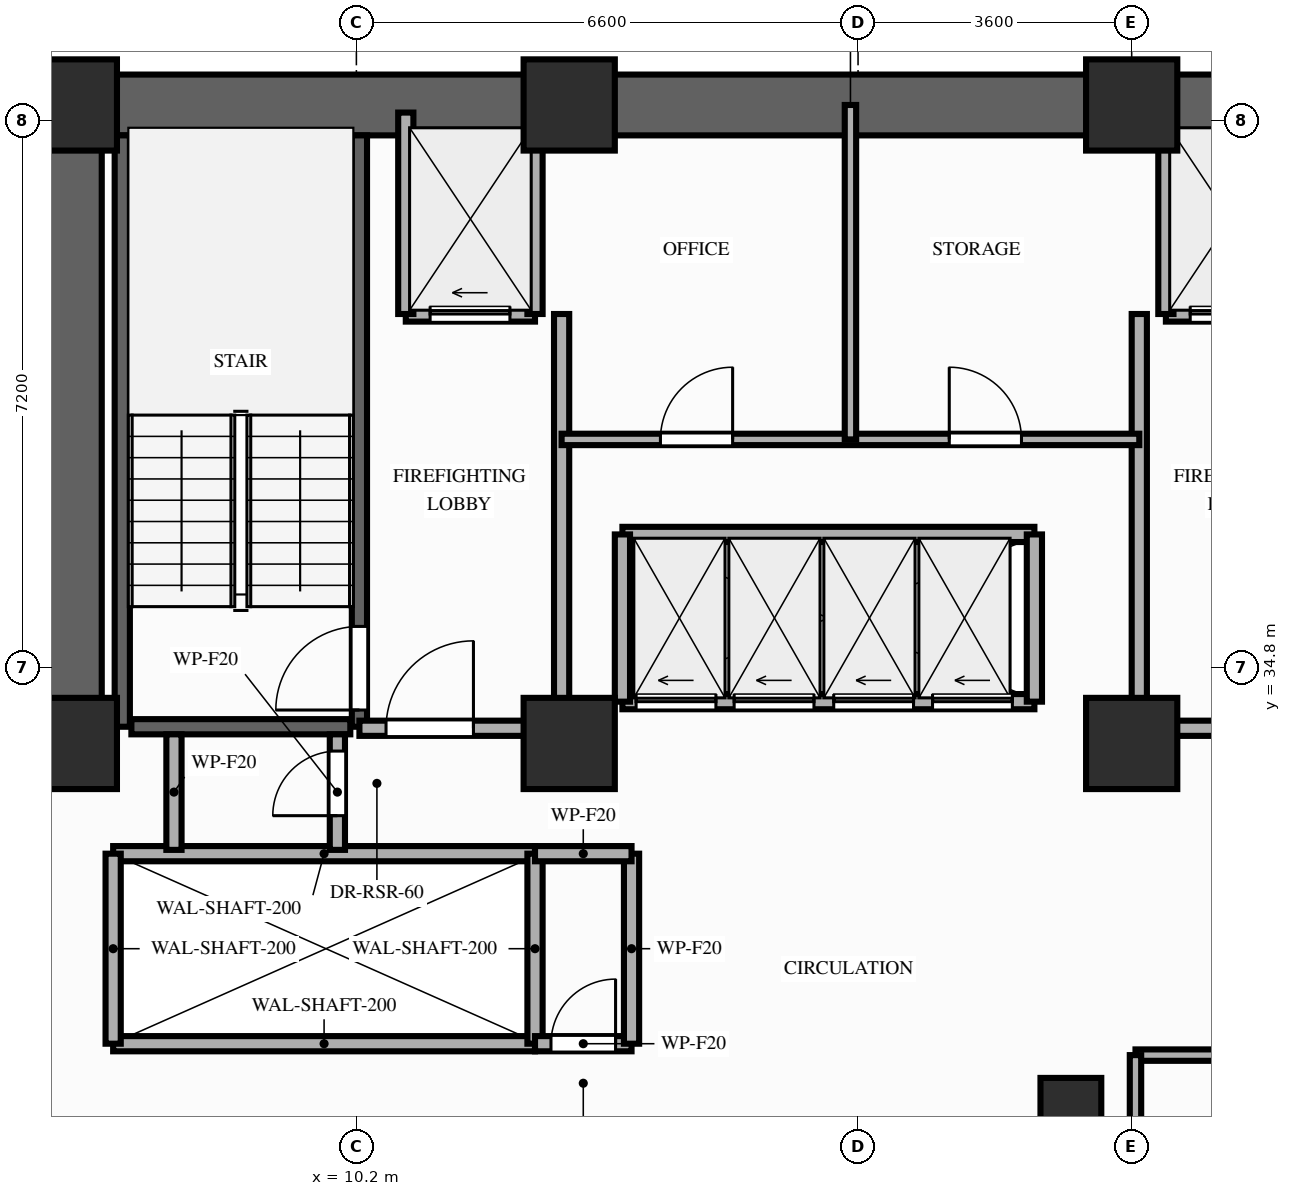
"""IFC4 building model, lengths in metres.
Left out: names, types, materials, properties, quantities, classifications, styles, units other than length and angle.
Written with IfcOpenShell. Run it as: python <this file> out.ifc"""

import sys

from ifc_helpers import new_model, si_unit, direction, frame, frame_2d, origin, origin_2d, place, context, subcontext, project, spatial, rectangle, extrude, element, fill, save


model = new_model("IFC4")
c1 = context("Model", 3, precision=1e-05, world=origin(), true_north=direction((0.0, 1.0)))
c2 = subcontext(c1, "Body", "Model", "MODEL_VIEW")
j1 = project(units=[si_unit("LENGTHUNIT", "METRE"), si_unit("PLANEANGLEUNIT", "RADIAN")], contexts=[c1])
p1 = place(None, origin())
s1 = spatial("IfcSite", under=j1, at=p1, CompositionType="ELEMENT")
p2 = place(p1, origin())
s2 = spatial("IfcBuilding", under=s1, at=p2, CompositionType="ELEMENT")
p3 = place(p2, frame((0.0, 0.0, 89.8)))
s3 = spatial("IfcBuildingStorey", under=s2, at=p3, CompositionType="ELEMENT", Elevation=89.8)
for number, where, z_axis, x_axis in (
    (1, (6.45, 33.8, 0.0), (0.0, 0.0, 1.0), (1.0, 0.0, 0.0)),
    (2, (13.0, 33.8, 0.0), (0.0, 0.0, 1.0), (1.0, 0.0, 0.0)),
    (3, (20.4, 33.8, 0.0), (0.0, 0.0, 1.0), (1.0, 0.0, 0.0)),
    (4, (6.45, 42.2, 0.0), (0.0, 0.0, 1.0), (1.0, 0.0, 0.0)),
    (5, (13.0, 42.2, 0.0), (0.0, 0.0, 1.0), (1.0, 0.0, 0.0)),
    (6, (20.4, 42.2, 0.0), (0.0, 0.0, 1.0), (1.0, 0.0, 0.0)),
):
    element("IfcColumn", number, at=place(p3, frame(where, z_axis=z_axis, x_axis=x_axis)), inside=s3, PredefinedType="COLUMN", context=c2, shape_type="SweptSolid", body=[
        extrude(rectangle(XDim=1.2, YDim=1.2, at=origin_2d()), origin(), (0.0, 0.0, 1.0), 3.2),
    ])
p4 = place(p3, frame((19.6, 28.8, 0.0), z_axis=(0.0, 0.0, 1.0), x_axis=(1.0, 0.0, 0.0)))
e7 = element("IfcColumn", 7, at=p4, inside=s3, PredefinedType="COLUMN", context=c2, shape_type="SweptSolid", body=[
    extrude(rectangle(XDim=0.8, YDim=1.2, at=origin_2d()), origin(), (0.0, 0.0, 1.0), 3.2),
])
p5 = place(p3, frame((6.45, 42.2, 0.0), z_axis=(0.0, 0.0, 1.0), x_axis=(1.0, 0.0, 0.0)))
e8 = element("IfcWall", 8, at=p5, inside=s3, PredefinedType="SHEAR", context=c2, shape_type="SweptSolid", body=[
    extrude(rectangle(XDim=20.45, YDim=0.8, at=frame_2d((10.225, 0.0))), origin(), (0.0, 0.0, 1.0), 3.02),
])
p6 = place(p3, frame((6.45, 33.8, 0.0), z_axis=(0.0, 0.0, 1.0), x_axis=(0.0, 1.0, 0.0)))
e9 = element("IfcWall", 9, at=p6, inside=s3, PredefinedType="SHEAR", context=c2, shape_type="SweptSolid", body=[
    extrude(rectangle(XDim=7.95, YDim=0.8, at=frame_2d((3.975, 0.0))), origin(), (0.0, 0.0, 1.0), 3.02),
])
p7 = place(p3, frame((7.12, 34.02, 0.0), z_axis=(0.0, 0.0, 1.0), x_axis=(0.0, 1.0, 0.0)))
e10 = element("IfcWall", 10, at=p7, inside=s3, PredefinedType="SHEAR", context=c2, shape_type="SweptSolid", body=[
    extrude(rectangle(XDim=7.78, YDim=0.2, at=frame_2d((3.89, 0.0))), origin(), (0.0, 0.0, 1.0), 3.02),
])
p8 = place(p3, frame((10.24, 34.02, 0.0), z_axis=(0.0, 0.0, 1.0), x_axis=(0.0, 1.0, 0.0)))
e11 = element("IfcWall", 11, at=p8, inside=s3, PredefinedType="SHEAR", context=c2, shape_type="SweptSolid", body=[
    extrude(rectangle(XDim=7.78, YDim=0.2, at=frame_2d((3.89, 0.0))), origin(), (0.0, 0.0, 1.0), 3.02),
])
p9 = place(p8, frame((0.22, 0.0, 0.0)))
e12 = element("IfcOpeningElement", 12, at=p9, cuts=e11, PredefinedType="OPENING", context=c2, shape_type="SweptSolid", body=[
    extrude(rectangle(XDim=1.1, YDim=2.15, at=frame_2d((0.55, 1.075))), frame((0.0, 0.11, 0.0), z_axis=(0.0, -1.0, 0.0), x_axis=(1.0, 0.0, 0.0)), (0.0, 0.0, 1.0), 0.22),
])
p10 = place(p3, frame((7.24, 34.02, 0.0), z_axis=(0.0, 0.0, 1.0), x_axis=(1.0, 0.0, 0.0)))
e13 = element("IfcWall", 13, at=p10, inside=s3, PredefinedType="SHEAR", context=c2, shape_type="SweptSolid", body=[
    extrude(rectangle(XDim=2.88, YDim=0.2, at=frame_2d((1.44, 0.0))), origin(), (0.0, 0.0, 1.0), 3.02),
])
for number, where, z_axis, x_axis in (
    (14, (7.0, 29.85, 0.0), (0.0, 0.0, 1.0), (1.0, 0.0, 0.0)),
    (15, (7.0, 32.35, 0.0), (0.0, 0.0, 1.0), (1.0, 0.0, 0.0)),
):
    element("IfcWall", number, at=place(p3, frame(where, z_axis=z_axis, x_axis=x_axis)), inside=s3, PredefinedType="MOVABLE", context=c2, shape_type="SweptSolid", body=[
        extrude(rectangle(XDim=5.55, YDim=0.2, at=frame_2d((2.775, 0.0))), origin(), (0.0, 0.0, 1.0), 3.02),
    ])
for number, where, z_axis, x_axis in (
    (16, (7.0, 29.85, 0.0), (0.0, 0.0, 1.0), (0.0, 1.0, 0.0)),
    (17, (12.55, 29.85, 0.0), (0.0, 0.0, 1.0), (0.0, 1.0, 0.0)),
):
    element("IfcWall", number, at=place(p3, frame(where, z_axis=z_axis, x_axis=x_axis)), inside=s3, PredefinedType="MOVABLE", context=c2, shape_type="SweptSolid", body=[
        extrude(rectangle(XDim=2.5, YDim=0.2, at=frame_2d((1.25, 0.0))), origin(), (0.0, 0.0, 1.0), 3.02),
    ])
p11 = place(p3, frame((10.85, 39.45, 0.0), z_axis=(0.0, 0.0, 1.0), x_axis=(1.0, 0.0, 0.0)))
e18 = element("IfcWall", 18, at=p11, inside=s3, PredefinedType="MOVABLE", context=c2, shape_type="SweptSolid", body=[
    extrude(rectangle(XDim=1.7, YDim=0.2, at=frame_2d((0.85, 0.0))), origin(), (0.0, 0.0, 1.0), 3.02),
])
p12 = place(p11, frame((0.32, 0.0, 0.0)))
e19 = element("IfcOpeningElement", 19, at=p12, cuts=e18, PredefinedType="OPENING", context=c2, shape_type="SweptSolid", body=[
    extrude(rectangle(XDim=1.05, YDim=2.15, at=frame_2d((0.525, 1.075))), frame((0.0, 0.11, 0.0), z_axis=(0.0, -1.0, 0.0), x_axis=(1.0, 0.0, 0.0)), (0.0, 0.0, 1.0), 0.22),
])
p13 = place(p3, frame((20.85, 39.45, 0.0), z_axis=(0.0, 0.0, 1.0), x_axis=(1.0, 0.0, 0.0)))
e20 = element("IfcWall", 20, at=p13, inside=s3, PredefinedType="MOVABLE", context=c2, shape_type="SweptSolid", body=[
    extrude(rectangle(XDim=1.7, YDim=0.2, at=frame_2d((0.85, 0.0))), origin(), (0.0, 0.0, 1.0), 3.02),
])
p14 = place(p13, frame((0.32, 0.0, 0.0)))
e21 = element("IfcOpeningElement", 21, at=p14, cuts=e20, PredefinedType="OPENING", context=c2, shape_type="SweptSolid", body=[
    extrude(rectangle(XDim=1.05, YDim=2.15, at=frame_2d((0.525, 1.075))), frame((0.0, 0.11, 0.0), z_axis=(0.0, -1.0, 0.0), x_axis=(1.0, 0.0, 0.0)), (0.0, 0.0, 1.0), 0.22),
])
for number, where, z_axis, x_axis in (
    (22, (10.85, 39.45, 0.0), (0.0, 0.0, 1.0), (0.0, 1.0, 0.0)),
    (23, (12.55, 39.45, 0.0), (0.0, 0.0, 1.0), (0.0, 1.0, 0.0)),
):
    element("IfcWall", number, at=place(p3, frame(where, z_axis=z_axis, x_axis=x_axis)), inside=s3, PredefinedType="MOVABLE", context=c2, shape_type="SweptSolid", body=[
        extrude(rectangle(XDim=2.65, YDim=0.2, at=frame_2d((1.325, 0.0))), origin(), (0.0, 0.0, 1.0), 2.4),
    ])
p15 = place(p3, frame((12.9, 34.0, 0.0), z_axis=(0.0, 0.0, 1.0), x_axis=(0.0, 1.0, 0.0)))
e24 = element("IfcWall", 24, at=p15, inside=s3, PredefinedType="PARTITIONING", context=c2, shape_type="SweptSolid", body=[
    extrude(rectangle(XDim=5.45, YDim=0.2, at=frame_2d((2.725, 0.0))), origin(), (0.0, 0.0, 1.0), 2.4),
])
p16 = place(p3, frame((10.24, 34.0, 0.0), z_axis=(0.0, 0.0, 1.0), x_axis=(1.0, 0.0, 0.0)))
e25 = element("IfcWall", 25, at=p16, inside=s3, PredefinedType="PARTITIONING", context=c2, shape_type="SweptSolid", body=[
    extrude(rectangle(XDim=2.66, YDim=0.2, at=frame_2d((1.33, 0.0))), origin(), (0.0, 0.0, 1.0), 2.4),
])
p17 = place(p16, frame((0.35, 0.0, 0.0)))
e26 = element("IfcOpeningElement", 26, at=p17, cuts=e25, PredefinedType="OPENING", context=c2, shape_type="SweptSolid", body=[
    extrude(rectangle(XDim=1.15, YDim=2.15, at=frame_2d((0.575, 1.075))), frame((0.0, 0.11, 0.0), z_axis=(0.0, -1.0, 0.0), x_axis=(1.0, 0.0, 0.0)), (0.0, 0.0, 1.0), 0.22),
])
p18 = place(p3, frame((20.85, 39.45, 0.0), z_axis=(0.0, 0.0, 1.0), x_axis=(0.0, 1.0, 0.0)))
e27 = element("IfcWall", 27, at=p18, inside=s3, PredefinedType="MOVABLE", context=c2, shape_type="SweptSolid", body=[
    extrude(rectangle(XDim=2.65, YDim=0.2, at=frame_2d((1.325, 0.0))), origin(), (0.0, 0.0, 1.0), 2.4),
])
p19 = place(p3, frame((20.5, 34.0, 0.0), z_axis=(0.0, 0.0, 1.0), x_axis=(0.0, 1.0, 0.0)))
e28 = element("IfcWall", 28, at=p19, inside=s3, PredefinedType="PARTITIONING", context=c2, shape_type="SweptSolid", body=[
    extrude(rectangle(XDim=5.45, YDim=0.2, at=frame_2d((2.725, 0.0))), origin(), (0.0, 0.0, 1.0), 2.4),
])
p20 = place(p3, frame((20.5, 34.0, 0.0), z_axis=(0.0, 0.0, 1.0), x_axis=(1.0, 0.0, 0.0)))
e29 = element("IfcWall", 29, at=p20, inside=s3, PredefinedType="PARTITIONING", context=c2, shape_type="SweptSolid", body=[
    extrude(rectangle(XDim=2.6, YDim=0.2, at=frame_2d((1.3, 0.0))), origin(), (0.0, 0.0, 1.0), 2.4),
])
p21 = place(p20, frame((1.05, 0.0, 0.0)))
e30 = element("IfcOpeningElement", 30, at=p21, cuts=e29, PredefinedType="OPENING", context=c2, shape_type="SweptSolid", body=[
    extrude(rectangle(XDim=1.15, YDim=2.15, at=frame_2d((0.575, 1.075))), frame((0.0, 0.11, 0.0), z_axis=(0.0, -1.0, 0.0), x_axis=(1.0, 0.0, 0.0)), (0.0, 0.0, 1.0), 0.22),
])
p22 = place(p3, frame((12.55, 29.85, 0.0), z_axis=(0.0, 0.0, 1.0), x_axis=(1.0, 0.0, 0.0)))
e31 = element("IfcWall", 31, at=p22, inside=s3, PredefinedType="PARTITIONING", context=c2, shape_type="SweptSolid", body=[
    extrude(rectangle(XDim=1.27, YDim=0.2, at=frame_2d((0.635, 0.0))), origin(), (0.0, 0.0, 1.0), 3.02),
])
p23 = place(p22, frame((0.21, 0.0, 0.0)))
e32 = element("IfcOpeningElement", 32, at=p23, cuts=e31, PredefinedType="OPENING", context=c2, shape_type="SweptSolid", body=[
    extrude(rectangle(XDim=0.85, YDim=2.05, at=frame_2d((0.425, 1.025))), frame((0.0, 0.11, 0.0), z_axis=(0.0, -1.0, 0.0), x_axis=(1.0, 0.0, 0.0)), (0.0, 0.0, 1.0), 0.22),
])
p24 = place(p3, frame((13.82, 29.85, 0.0), z_axis=(0.0, 0.0, 1.0), x_axis=(0.0, 1.0, 0.0)))
e33 = element("IfcWall", 33, at=p24, inside=s3, PredefinedType="PARTITIONING", context=c2, shape_type="SweptSolid", body=[
    extrude(rectangle(XDim=2.5, YDim=0.2, at=frame_2d((1.25, 0.0))), origin(), (0.0, 0.0, 1.0), 3.02),
])
p25 = place(p3, frame((12.55, 32.35, 0.0), z_axis=(0.0, 0.0, 1.0), x_axis=(1.0, 0.0, 0.0)))
e34 = element("IfcWall", 34, at=p25, inside=s3, PredefinedType="PARTITIONING", context=c2, shape_type="SweptSolid", body=[
    extrude(rectangle(XDim=1.27, YDim=0.2, at=frame_2d((0.635, 0.0))), origin(), (0.0, 0.0, 1.0), 3.02),
])
p26 = place(p3, frame((7.8, 32.4, 0.0), z_axis=(0.0, 0.0, 1.0), x_axis=(0.0, 1.0, 0.0)))
e35 = element("IfcWall", 35, at=p26, inside=s3, PredefinedType="PARTITIONING", context=c2, shape_type="SweptSolid", body=[
    extrude(rectangle(XDim=1.52, YDim=0.2, at=frame_2d((0.76, 0.0))), origin(), (0.0, 0.0, 1.0), 2.4),
])
p27 = place(p3, frame((9.95, 32.4, 0.0), z_axis=(0.0, 0.0, 1.0), x_axis=(0.0, 1.0, 0.0)))
e36 = element("IfcWall", 36, at=p27, inside=s3, PredefinedType="PARTITIONING", context=c2, shape_type="SweptSolid", body=[
    extrude(rectangle(XDim=1.52, YDim=0.2, at=frame_2d((0.76, 0.0))), origin(), (0.0, 0.0, 1.0), 2.4),
])
p28 = place(p27, frame((0.45, 0.0, 0.0)))
e37 = element("IfcOpeningElement", 37, at=p28, cuts=e36, PredefinedType="OPENING", context=c2, shape_type="SweptSolid", body=[
    extrude(rectangle(XDim=0.85, YDim=2.05, at=frame_2d((0.425, 1.025))), frame((0.0, 0.11, 0.0), z_axis=(0.0, -1.0, 0.0), x_axis=(1.0, 0.0, 0.0)), (0.0, 0.0, 1.0), 0.22),
])
p29 = place(p3, frame((12.9, 37.8, 0.0), z_axis=(0.0, 0.0, 1.0), x_axis=(1.0, 0.0, 0.0)))
e38 = element("IfcWall", 38, at=p29, inside=s3, PredefinedType="PARTITIONING", context=c2, shape_type="SweptSolid", body=[
    extrude(rectangle(XDim=7.6, YDim=0.15, at=frame_2d((3.8, 0.0))), origin(), (0.0, 0.0, 1.0), 3.02),
])
p30 = place(p29, frame((1.3, 0.0, 0.0)))
e39 = element("IfcOpeningElement", 39, at=p30, cuts=e38, PredefinedType="OPENING", context=c2, shape_type="SweptSolid", body=[
    extrude(rectangle(XDim=0.95, YDim=2.15, at=frame_2d((0.475, 1.075))), frame((0.0, 0.085, 0.0), z_axis=(0.0, -1.0, 0.0), x_axis=(1.0, 0.0, 0.0)), (0.0, 0.0, 1.0), 0.17),
])
p31 = place(p29, frame((5.1, 0.0, 0.0)))
e40 = element("IfcOpeningElement", 40, at=p31, cuts=e38, PredefinedType="OPENING", context=c2, shape_type="SweptSolid", body=[
    extrude(rectangle(XDim=0.95, YDim=2.15, at=frame_2d((0.475, 1.075))), frame((0.0, 0.085, 0.0), z_axis=(0.0, -1.0, 0.0), x_axis=(1.0, 0.0, 0.0)), (0.0, 0.0, 1.0), 0.17),
])
p32 = place(p3, frame((16.7, 37.8, 0.0), z_axis=(0.0, 0.0, 1.0), x_axis=(0.0, 1.0, 0.0)))
e41 = element("IfcWall", 41, at=p32, inside=s3, PredefinedType="PARTITIONING", context=c2, shape_type="SweptSolid", body=[
    extrude(rectangle(XDim=4.4, YDim=0.15, at=frame_2d((2.2, 0.0))), origin(), (0.0, 0.0, 1.0), 2.4),
])
p33 = place(p3, frame((13.7, 34.35, 0.0), z_axis=(0.0, 0.0, 1.0), x_axis=(1.0, 0.0, 0.0)))
e42 = element("IfcWall", 42, at=p33, inside=s3, PredefinedType="MOVABLE", context=c2, shape_type="SweptSolid", body=[
    extrude(rectangle(XDim=5.42, YDim=0.2, at=frame_2d((2.71, 0.0))), origin(), (0.0, 0.0, 1.0), 3.02),
])
p34 = place(p33, frame((0.18, 0.0, 0.0)))
e43 = element("IfcOpeningElement", 43, at=p34, cuts=e42, PredefinedType="OPENING", context=c2, shape_type="SweptSolid", body=[
    extrude(rectangle(XDim=1.05, YDim=2.15, at=frame_2d((0.525, 1.075))), frame((0.0, 0.11, 0.0), z_axis=(0.0, -1.0, 0.0), x_axis=(1.0, 0.0, 0.0)), (0.0, 0.0, 1.0), 0.22),
])
p35 = place(p33, frame((1.47, 0.0, 0.0)))
e44 = element("IfcOpeningElement", 44, at=p35, cuts=e42, PredefinedType="OPENING", context=c2, shape_type="SweptSolid", body=[
    extrude(rectangle(XDim=1.05, YDim=2.15, at=frame_2d((0.525, 1.075))), frame((0.0, 0.11, 0.0), z_axis=(0.0, -1.0, 0.0), x_axis=(1.0, 0.0, 0.0)), (0.0, 0.0, 1.0), 0.22),
])
p36 = place(p33, frame((2.78, 0.0, 0.0)))
e45 = element("IfcOpeningElement", 45, at=p36, cuts=e42, PredefinedType="OPENING", context=c2, shape_type="SweptSolid", body=[
    extrude(rectangle(XDim=1.05, YDim=2.15, at=frame_2d((0.525, 1.075))), frame((0.0, 0.11, 0.0), z_axis=(0.0, -1.0, 0.0), x_axis=(1.0, 0.0, 0.0)), (0.0, 0.0, 1.0), 0.22),
])
p37 = place(p33, frame((4.08, 0.0, 0.0)))
e46 = element("IfcOpeningElement", 46, at=p37, cuts=e42, PredefinedType="OPENING", context=c2, shape_type="SweptSolid", body=[
    extrude(rectangle(XDim=1.05, YDim=2.15, at=frame_2d((0.525, 1.075))), frame((0.0, 0.11, 0.0), z_axis=(0.0, -1.0, 0.0), x_axis=(1.0, 0.0, 0.0)), (0.0, 0.0, 1.0), 0.22),
])
p38 = place(p3, frame((13.7, 36.55, 0.0), z_axis=(0.0, 0.0, 1.0), x_axis=(1.0, 0.0, 0.0)))
e47 = element("IfcWall", 47, at=p38, inside=s3, PredefinedType="MOVABLE", context=c2, shape_type="SweptSolid", body=[
    extrude(rectangle(XDim=5.42, YDim=0.2, at=frame_2d((2.71, 0.0))), origin(), (0.0, 0.0, 1.0), 3.02),
])
for number, where, z_axis, x_axis in (
    (48, (13.7, 34.35, 0.0), (0.0, 0.0, 1.0), (0.0, 1.0, 0.0)),
    (49, (19.12, 34.35, 0.0), (0.0, 0.0, 1.0), (0.0, 1.0, 0.0)),
):
    element("IfcWall", number, at=place(p3, frame(where, z_axis=z_axis, x_axis=x_axis)), inside=s3, PredefinedType="MOVABLE", context=c2, shape_type="SweptSolid", body=[
        extrude(rectangle(XDim=2.2, YDim=0.2, at=frame_2d((1.1, 0.0))), origin(), (0.0, 0.0, 1.0), 3.02),
    ])
p39 = place(p3, frame((20.45, 29.7, 0.0), z_axis=(0.0, 0.0, 1.0), x_axis=(1.0, 0.0, 0.0)))
e50 = element("IfcWall", 50, at=p39, inside=s3, PredefinedType="PARTITIONING", context=c2, shape_type="SweptSolid", body=[
    extrude(rectangle(XDim=6.7, YDim=0.15, at=frame_2d((3.35, 0.0))), origin(), (0.0, 0.0, 1.0), 3.02),
])
p40 = place(p39, frame((2.8, 0.0, 0.0)))
e51 = element("IfcOpeningElement", 51, at=p40, cuts=e50, PredefinedType="OPENING", context=c2, shape_type="SweptSolid", body=[
    extrude(rectangle(XDim=0.95, YDim=2.15, at=frame_2d((0.475, 1.075))), frame((0.0, 0.085, 0.0), z_axis=(0.0, -1.0, 0.0), x_axis=(1.0, 0.0, 0.0)), (0.0, 0.0, 1.0), 0.17),
])
p41 = place(p3, frame((20.45, 26.75, 0.0), z_axis=(0.0, 0.0, 1.0), x_axis=(0.0, 1.0, 0.0)))
e52 = element("IfcWall", 52, at=p41, inside=s3, PredefinedType="PARTITIONING", context=c2, shape_type="SweptSolid", body=[
    extrude(rectangle(XDim=2.95, YDim=0.15, at=frame_2d((1.475, 0.0))), origin(), (0.0, 0.0, 1.0), 2.4),
])
p42 = place(p9, origin())
e53 = element("IfcDoor", 53, at=p42, inside=s3, OperationType="SINGLE_SWING_LEFT", PredefinedType="DOOR", context=c2, shape_type="SweptSolid", body=[
    extrude(rectangle(XDim=1.1, YDim=2.15, at=frame_2d((0.55, 1.075))), frame((0.0, 0.025, 0.0), z_axis=(0.0, -1.0, 0.0), x_axis=(1.0, 0.0, 0.0)), (0.0, 0.0, 1.0), 0.05),
])
fill(e12, e53)
p43 = place(p12, origin())
e54 = element("IfcDoor", 54, at=p43, inside=s3, OperationType="SLIDING_TO_LEFT", PredefinedType="DOOR", context=c2, shape_type="SweptSolid", body=[
    extrude(rectangle(XDim=1.05, YDim=2.15, at=frame_2d((0.525, 1.075))), frame((0.0, 0.025, 0.0), z_axis=(0.0, -1.0, 0.0), x_axis=(1.0, 0.0, 0.0)), (0.0, 0.0, 1.0), 0.05),
])
fill(e19, e54)
p44 = place(p14, origin())
e55 = element("IfcDoor", 55, at=p44, inside=s3, OperationType="SLIDING_TO_LEFT", PredefinedType="DOOR", context=c2, shape_type="SweptSolid", body=[
    extrude(rectangle(XDim=1.05, YDim=2.15, at=frame_2d((0.525, 1.075))), frame((0.0, 0.025, 0.0), z_axis=(0.0, -1.0, 0.0), x_axis=(1.0, 0.0, 0.0)), (0.0, 0.0, 1.0), 0.05),
])
fill(e21, e55)
p45 = place(p17, origin())
e56 = element("IfcDoor", 56, at=p45, inside=s3, OperationType="SINGLE_SWING_RIGHT", PredefinedType="DOOR", context=c2, shape_type="SweptSolid", body=[
    extrude(rectangle(XDim=1.15, YDim=2.15, at=frame_2d((0.575, 1.075))), frame((0.0, 0.025, 0.0), z_axis=(0.0, -1.0, 0.0), x_axis=(1.0, 0.0, 0.0)), (0.0, 0.0, 1.0), 0.05),
])
fill(e26, e56)
p46 = place(p23, origin())
e57 = element("IfcDoor", 57, at=p46, inside=s3, OperationType="SINGLE_SWING_RIGHT", PredefinedType="DOOR", context=c2, shape_type="SweptSolid", body=[
    extrude(rectangle(XDim=0.85, YDim=2.05, at=frame_2d((0.425, 1.025))), frame((0.0, 0.025, 0.0), z_axis=(0.0, -1.0, 0.0), x_axis=(1.0, 0.0, 0.0)), (0.0, 0.0, 1.0), 0.05),
])
fill(e32, e57)
p47 = place(p28, origin())
e58 = element("IfcDoor", 58, at=p47, inside=s3, OperationType="SINGLE_SWING_LEFT", PredefinedType="DOOR", context=c2, shape_type="SweptSolid", body=[
    extrude(rectangle(XDim=0.85, YDim=2.05, at=frame_2d((0.425, 1.025))), frame((0.0, 0.025, 0.0), z_axis=(0.0, -1.0, 0.0), x_axis=(1.0, 0.0, 0.0)), (0.0, 0.0, 1.0), 0.05),
])
fill(e37, e58)
p48 = place(p30, origin())
e59 = element("IfcDoor", 59, at=p48, inside=s3, OperationType="SINGLE_SWING_RIGHT", PredefinedType="DOOR", context=c2, shape_type="SweptSolid", body=[
    extrude(rectangle(XDim=0.95, YDim=2.15, at=frame_2d((0.475, 1.075))), frame((0.0, 0.025, 0.0), z_axis=(0.0, -1.0, 0.0), x_axis=(1.0, 0.0, 0.0)), (0.0, 0.0, 1.0), 0.05),
])
fill(e39, e59)
p49 = place(p31, origin())
e60 = element("IfcDoor", 60, at=p49, inside=s3, OperationType="SINGLE_SWING_LEFT", PredefinedType="DOOR", context=c2, shape_type="SweptSolid", body=[
    extrude(rectangle(XDim=0.95, YDim=2.15, at=frame_2d((0.475, 1.075))), frame((0.0, 0.025, 0.0), z_axis=(0.0, -1.0, 0.0), x_axis=(1.0, 0.0, 0.0)), (0.0, 0.0, 1.0), 0.05),
])
fill(e40, e60)
p50 = place(p34, origin())
e61 = element("IfcDoor", 61, at=p50, inside=s3, OperationType="SLIDING_TO_LEFT", PredefinedType="DOOR", context=c2, shape_type="SweptSolid", body=[
    extrude(rectangle(XDim=1.05, YDim=2.15, at=frame_2d((0.525, 1.075))), frame((0.0, 0.025, 0.0), z_axis=(0.0, -1.0, 0.0), x_axis=(1.0, 0.0, 0.0)), (0.0, 0.0, 1.0), 0.05),
])
fill(e43, e61)
p51 = place(p35, origin())
e62 = element("IfcDoor", 62, at=p51, inside=s3, OperationType="SLIDING_TO_LEFT", PredefinedType="DOOR", context=c2, shape_type="SweptSolid", body=[
    extrude(rectangle(XDim=1.05, YDim=2.15, at=frame_2d((0.525, 1.075))), frame((0.0, 0.025, 0.0), z_axis=(0.0, -1.0, 0.0), x_axis=(1.0, 0.0, 0.0)), (0.0, 0.0, 1.0), 0.05),
])
fill(e44, e62)
p52 = place(p36, origin())
e63 = element("IfcDoor", 63, at=p52, inside=s3, OperationType="SLIDING_TO_LEFT", PredefinedType="DOOR", context=c2, shape_type="SweptSolid", body=[
    extrude(rectangle(XDim=1.05, YDim=2.15, at=frame_2d((0.525, 1.075))), frame((0.0, 0.025, 0.0), z_axis=(0.0, -1.0, 0.0), x_axis=(1.0, 0.0, 0.0)), (0.0, 0.0, 1.0), 0.05),
])
fill(e45, e63)
p53 = place(p37, origin())
e64 = element("IfcDoor", 64, at=p53, inside=s3, OperationType="SLIDING_TO_LEFT", PredefinedType="DOOR", context=c2, shape_type="SweptSolid", body=[
    extrude(rectangle(XDim=1.05, YDim=2.15, at=frame_2d((0.525, 1.075))), frame((0.0, 0.025, 0.0), z_axis=(0.0, -1.0, 0.0), x_axis=(1.0, 0.0, 0.0)), (0.0, 0.0, 1.0), 0.05),
])
fill(e46, e64)
save(model, sys.argv[1])
